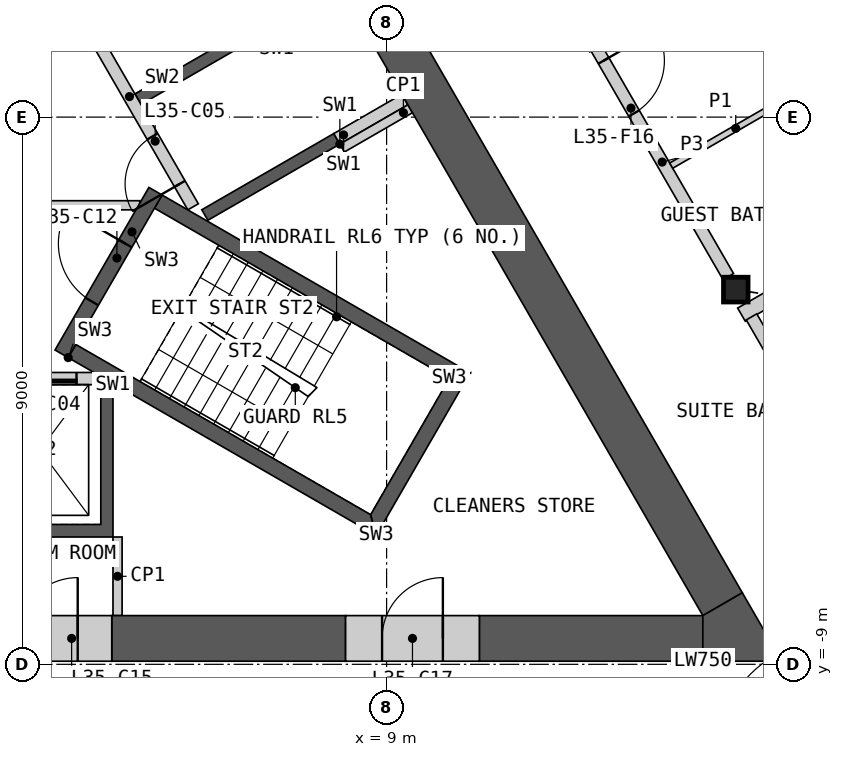
"""IFC4 building model, lengths in metres.
Left out: names, types, materials, properties, quantities, classifications, styles, units other than length and angle.
Written with IfcOpenShell. Run it as: python <this file> out.ifc"""

import sys

from ifc_helpers import new_model, si_unit, direction, frame, frame_2d, origin, origin_2d, place, context, subcontext, project, spatial, polyline, rectangle, i_section, outline, extrude, element, fill, save


model = new_model("IFC4")
c1 = context("Model", 3, precision=1e-05, world=origin(), true_north=direction((0.0, 1.0)))
c2 = subcontext(c1, "Body", "Model", "MODEL_VIEW")
j1 = project(units=[si_unit("LENGTHUNIT", "METRE"), si_unit("PLANEANGLEUNIT", "RADIAN")], contexts=[c1])
p1 = place(None, origin())
s1 = spatial("IfcSite", under=j1, at=p1, CompositionType="ELEMENT")
p2 = place(p1, origin())
s2 = spatial("IfcBuilding", under=s1, at=p2, CompositionType="ELEMENT")
p3 = place(p2, frame((0.0, 0.0, 169.2)))
s3 = spatial("IfcBuildingStorey", under=s2, at=p3, CompositionType="ELEMENT", Elevation=169.2)
p4 = place(p3, frame((14.743, -2.837, 0.0), z_axis=(0.0, 0.0, 1.0), x_axis=(1.0, 0.0, 0.0)))
e1 = element("IfcColumn", 1, at=p4, inside=s3, PredefinedType="COLUMN", context=c2, shape_type="SweptSolid", body=[
    extrude(i_section(OverallWidth=0.404, OverallDepth=0.407, WebThickness=0.027, FlangeThickness=0.044, at=origin_2d()), origin(), (0.0, 0.0, 1.0), 3.6),
])
p5 = place(p3, origin())
e2 = element("IfcWall", 2, at=p5, inside=s3, PredefinedType="SHEAR", context=c2, shape_type="SweptSolid", body=[
    extrude(outline(polyline([(4.5, -4.4), (4.5, -6.906), (2.1, -6.906), (2.1, -4.4), (2.3, -4.4), (2.3, -6.7), (4.3, -6.7), (4.3, -4.4), (4.5, -4.4)])), origin(), (0.0, 0.0, 1.0), 3.25),
])
p6 = place(p3, frame((-4.187, -4.3, 0.0), z_axis=(0.0, 0.0, 1.0), x_axis=(1.0, 0.0, 0.0)))
e3 = element("IfcWall", 3, at=p6, inside=s3, PredefinedType="SOLIDWALL", context=c2, shape_type="SweptSolid", body=[
    extrude(rectangle(XDim=8.373, YDim=0.2, at=frame_2d((4.187, 0.0))), origin(), (0.0, 0.0, 1.0), 3.25),
])
p7 = place(p6, frame((0.287, 0.0, 0.0)))
e4 = element("IfcOpeningElement", 4, at=p7, cuts=e3, PredefinedType="OPENING", context=c2, shape_type="SweptSolid", body=[
    extrude(rectangle(XDim=1.2, YDim=2.1, at=frame_2d((0.6, 1.05))), frame((0.0, 0.11, 0.0), z_axis=(0.0, -1.0, 0.0), x_axis=(1.0, 0.0, 0.0)), (0.0, 0.0, 1.0), 0.22),
])
p8 = place(p6, frame((2.387, 0.0, 0.0)))
e5 = element("IfcOpeningElement", 5, at=p8, cuts=e3, PredefinedType="OPENING", context=c2, shape_type="SweptSolid", body=[
    extrude(rectangle(XDim=1.4, YDim=2.1, at=frame_2d((0.7, 1.05))), frame((0.0, 0.11, 0.0), z_axis=(0.0, -1.0, 0.0), x_axis=(1.0, 0.0, 0.0)), (0.0, 0.0, 1.0), 0.22),
])
p9 = place(p6, frame((4.837, 0.0, 0.0)))
e6 = element("IfcOpeningElement", 6, at=p9, cuts=e3, PredefinedType="OPENING", context=c2, shape_type="SweptSolid", body=[
    extrude(rectangle(XDim=0.9, YDim=2.1, at=frame_2d((0.45, 1.05))), frame((0.0, 0.11, 0.0), z_axis=(0.0, -1.0, 0.0), x_axis=(1.0, 0.0, 0.0)), (0.0, 0.0, 1.0), 0.22),
])
p10 = place(p6, frame((6.887, 0.0, 0.0)))
e7 = element("IfcOpeningElement", 7, at=p10, cuts=e3, PredefinedType="OPENING", context=c2, shape_type="SweptSolid", body=[
    extrude(rectangle(XDim=1.2, YDim=2.1, at=frame_2d((0.6, 1.05))), frame((0.0, 0.11, 0.0), z_axis=(0.0, -1.0, 0.0), x_axis=(1.0, 0.0, 0.0)), (0.0, 0.0, 1.0), 0.22),
])
p11 = place(p3, origin())
e8 = element("IfcWall", 8, at=p11, inside=s3, PredefinedType="SHEAR", context=c2, shape_type="SweptSolid", body=[
    extrude(outline(polyline([(1.561, 6.097), (3.731, 7.35), (7.131, 1.461), (4.96, 0.208), (4.861, 0.381), (6.852, 1.531), (4.752, 5.169), (2.76, 4.019), (2.66, 4.192), (4.652, 5.342), (3.652, 7.074), (1.66, 5.924), (1.561, 6.097)])), origin(), (0.0, 0.0, 1.0), 3.25),
])
p12 = place(p3, origin())
e9 = element("IfcWall", 9, at=p12, inside=s3, PredefinedType="SHEAR", context=c2, shape_type="SweptSolid", body=[
    extrude(outline(polyline([(8.231, -0.444), (6.061, -1.697), (5.96, -1.524), (8.131, -0.271), (8.231, -0.444)])), origin(), (0.0, 0.0, 1.0), 3.25),
])
p13 = place(p3, frame((5.817, -1.476, 0.0), z_axis=(0.0, 0.0, 1.0), x_axis=(-0.500002616675, 0.866023893041, 0.0)))
e10 = element("IfcWall", 10, at=p13, inside=s3, PredefinedType="SOLIDWALL", context=c2, shape_type="SweptSolid", body=[
    extrude(rectangle(XDim=8.373, YDim=0.2, at=frame_2d((4.187, 0.0))), origin(), (0.0, 0.0, 1.0), 3.25),
])
p14 = place(p13, frame((0.437, 0.0, 0.0)))
e11 = element("IfcOpeningElement", 11, at=p14, cuts=e10, PredefinedType="OPENING", context=c2, shape_type="SweptSolid", body=[
    extrude(rectangle(XDim=0.9, YDim=2.1, at=frame_2d((0.45, 1.05))), frame((0.0, 0.11, 0.0), z_axis=(0.0, -1.0, 0.0), x_axis=(1.0, 0.0, 0.0)), (0.0, 0.0, 1.0), 0.22),
])
p15 = place(p13, frame((3.737, 0.0, 0.0)))
e12 = element("IfcOpeningElement", 12, at=p15, cuts=e10, PredefinedType="OPENING", context=c2, shape_type="SweptSolid", body=[
    extrude(rectangle(XDim=0.9, YDim=2.1, at=frame_2d((0.45, 1.05))), frame((0.0, 0.11, 0.0), z_axis=(0.0, -1.0, 0.0), x_axis=(1.0, 0.0, 0.0)), (0.0, 0.0, 1.0), 0.22),
])
p16 = place(p13, frame((6.937, 0.0, 0.0)))
e13 = element("IfcOpeningElement", 13, at=p16, cuts=e10, PredefinedType="OPENING", context=c2, shape_type="SweptSolid", body=[
    extrude(rectangle(XDim=1.1, YDim=2.1, at=frame_2d((0.55, 1.05))), frame((0.0, 0.11, 0.0), z_axis=(0.0, -1.0, 0.0), x_axis=(1.0, 0.0, 0.0)), (0.0, 0.0, 1.0), 0.22),
])
p17 = place(p3, frame((8.181, -0.357, 0.0), z_axis=(0.0, 0.0, 1.0), x_axis=(0.866003189247, 0.500038474733, 0.0)))
e14 = element("IfcWall", 14, at=p17, inside=s3, PredefinedType="SHEAR", context=c2, shape_type="SweptSolid", body=[
    extrude(rectangle(XDim=1.293, YDim=0.2, at=frame_2d((0.646, 0.0))), origin(), (0.0, 0.0, 1.0), 3.25),
])
p18 = place(p3, frame((-4.941, -1.45, 0.0), z_axis=(0.0, 0.0, 1.0), x_axis=(1.0, 0.0, 0.0)))
e15 = element("IfcWall", 15, at=p18, inside=s3, PredefinedType="PARTITIONING", context=c2, shape_type="SweptSolid", body=[
    extrude(rectangle(XDim=9.882, YDim=0.15, at=frame_2d((4.941, 0.0))), origin(), (0.0, 0.0, 1.0), 3.25),
])
p19 = place(p18, frame((4.391, 0.0, 0.0)))
e16 = element("IfcOpeningElement", 16, at=p19, cuts=e15, PredefinedType="OPENING", context=c2, shape_type="SweptSolid", body=[
    extrude(rectangle(XDim=1.1, YDim=2.1, at=frame_2d((0.55, 1.05))), frame((0.0, 0.085, 0.0), z_axis=(0.0, -1.0, 0.0), x_axis=(1.0, 0.0, 0.0)), (0.0, 0.0, 1.0), 0.17),
])
p20 = place(p3, origin())
e17 = element("IfcWall", 17, at=p20, inside=s3, PredefinedType="SHEAR", context=c2, shape_type="SweptSolid", body=[
    extrude(outline(polyline([(3.763, -3.956), (8.83, -6.881), (8.738, -6.539), (3.888, -3.739), (3.763, -3.956)])), origin(), (0.0, 0.0, 1.0), 3.25),
])
p21 = place(p3, origin())
e18 = element("IfcWall", 18, at=p21, inside=s3, PredefinedType="SHEAR", context=c2, shape_type="SweptSolid", body=[
    extrude(outline(polyline([(8.83, -6.881), (10.374, -4.206), (10.032, -4.298), (8.738, -6.539), (8.83, -6.881)])), origin(), (0.0, 0.0, 1.0), 3.25),
])
p22 = place(p3, origin())
e19 = element("IfcWall", 19, at=p22, inside=s3, PredefinedType="SHEAR", context=c2, shape_type="SweptSolid", body=[
    extrude(outline(polyline([(10.032, -4.298), (10.374, -4.206), (5.307, -1.281), (5.182, -1.498), (10.032, -4.298)])), origin(), (0.0, 0.0, 1.0), 3.25),
])
p23 = place(p3, frame((3.655, -3.893, 0.0), z_axis=(0.0, 0.0, 1.0), x_axis=(0.499982516597, 0.866035497597, 0.0)))
e20 = element("IfcWall", 20, at=p23, inside=s3, PredefinedType="SHEAR", context=c2, shape_type="SweptSolid", body=[
    extrude(rectangle(XDim=3.088, YDim=0.25, at=frame_2d((1.544, 0.0))), origin(), (0.0, 0.0, 1.0), 3.25),
])
p24 = place(p23, frame((0.994, 0.0, 0.0)))
e21 = element("IfcOpeningElement", 21, at=p24, cuts=e20, PredefinedType="OPENING", context=c2, shape_type="SweptSolid", body=[
    extrude(rectangle(XDim=1.1, YDim=2.1, at=frame_2d((0.55, 1.05))), frame((0.0, 0.135, 0.0), z_axis=(0.0, -1.0, 0.0), x_axis=(1.0, 0.0, 0.0)), (0.0, 0.0, 1.0), 0.27),
])
for number, where, z_axis, x_axis in (
    (22, (4.575, -6.906, 0.0), (0.0, 0.0, 1.0), (0.0, -1.0, 0.0)),
    (23, (8.268, -0.509, 0.0), (0.0, 0.0, 1.0), (0.866, 0.5, 0.0)),
):
    element("IfcWall", number, at=place(p3, frame(where, z_axis=z_axis, x_axis=x_axis)), inside=s3, PredefinedType="PARTITIONING", context=c2, shape_type="SweptSolid", body=[
        extrude(rectangle(XDim=1.293, YDim=0.15, at=frame_2d((0.646, 0.0))), origin(), (0.0, 0.0, 1.0), 3.25),
    ])
p25 = place(p3, frame((4.48, -8.574, 0.0), z_axis=(0.0, 0.0, 1.0), x_axis=(1.0, 0.0, 0.0)))
e24 = element("IfcWall", 24, at=p25, inside=s3, PredefinedType="SHEAR", context=c2, shape_type="SweptSolid", body=[
    extrude(rectangle(XDim=3.845, YDim=0.75, at=frame_2d((1.923, 0.0))), origin(), (0.0, 0.0, 1.0), 3.25),
])
p26 = place(p3, frame((10.525, -8.574, 0.0), z_axis=(0.0, 0.0, 1.0), x_axis=(1.0, 0.0, 0.0)))
e25 = element("IfcWall", 25, at=p26, inside=s3, PredefinedType="SHEAR", context=c2, shape_type="SweptSolid", body=[
    extrude(rectangle(XDim=3.676, YDim=0.75, at=frame_2d((1.838, 0.0))), origin(), (0.0, 0.0, 1.0), 3.25),
])
p27 = place(p3, frame((14.526, -8.011, 0.0), z_axis=(0.0, 0.0, 1.0), x_axis=(-0.499994855372, 0.866028374016, 0.0)))
e26 = element("IfcWall", 26, at=p27, inside=s3, PredefinedType="SHEAR", context=c2, shape_type="SweptSolid", body=[
    extrude(rectangle(XDim=14.301, YDim=0.75, at=frame_2d((7.15, 0.0))), origin(), (0.0, 0.0, 1.0), 3.25),
])
p28 = place(p3, origin())
e27 = element("IfcWall", 27, at=p28, inside=s3, PredefinedType="SHEAR", context=c2, shape_type="SweptSolid", body=[
    extrude(outline(polyline([(14.201, -8.949), (14.201, -8.199), (14.851, -7.824), (15.5, -8.949), (14.201, -8.949)])), origin(), (0.0, 0.0, 1.0), 3.25),
])
p29 = place(p3, frame((2.32, -8.574, 0.0), z_axis=(0.0, 0.0, 1.0), x_axis=(1.0, 0.0, 0.0)))
e28 = element("IfcWall", 28, at=p29, inside=s3, PredefinedType="SHEAR", context=c2, shape_type="SweptSolid", body=[
    extrude(rectangle(XDim=2.16, YDim=0.75, at=frame_2d((1.08, 0.0))), origin(), (0.0, 0.0, 1.0), 3.25),
])
p30 = place(p29, frame((0.6, 0.0, 0.0)))
e29 = element("IfcOpeningElement", 29, at=p30, cuts=e28, PredefinedType="OPENING", context=c2, shape_type="SweptSolid", body=[
    extrude(rectangle(XDim=1.0, YDim=2.1, at=frame_2d((0.5, 1.05))), frame((0.0, 0.385, 0.0), z_axis=(0.0, -1.0, 0.0), x_axis=(1.0, 0.0, 0.0)), (0.0, 0.0, 1.0), 0.77),
])
p31 = place(p3, frame((8.325, -8.574, 0.0), z_axis=(0.0, 0.0, 1.0), x_axis=(1.0, 0.0, 0.0)))
e30 = element("IfcWall", 30, at=p31, inside=s3, PredefinedType="SHEAR", context=c2, shape_type="SweptSolid", body=[
    extrude(rectangle(XDim=2.2, YDim=0.75, at=frame_2d((1.1, 0.0))), origin(), (0.0, 0.0, 1.0), 3.25),
])
p32 = place(p31, frame((0.6, 0.0, 0.0)))
e31 = element("IfcOpeningElement", 31, at=p32, cuts=e30, PredefinedType="OPENING", context=c2, shape_type="SweptSolid", body=[
    extrude(rectangle(XDim=1.0, YDim=2.1, at=frame_2d((0.5, 1.05))), frame((0.0, 0.385, 0.0), z_axis=(0.0, -1.0, 0.0), x_axis=(1.0, 0.0, 0.0)), (0.0, 0.0, 1.0), 0.77),
])
p33 = place(p3, frame((14.836, -3.249, 0.0), z_axis=(0.0, 0.0, 1.0), x_axis=(0.866022412254, 0.500005181446, 0.0)))
e32 = element("IfcWall", 32, at=p33, inside=s3, PredefinedType="PARTITIONING", context=c2, shape_type="SweptSolid", body=[
    extrude(rectangle(XDim=13.081, YDim=0.25, at=frame_2d((6.541, 0.0))), origin(), (0.0, 0.0, 1.0), 2.404),
])
p34 = place(p3, frame((15.002, -3.286, 0.0), z_axis=(0.0, 0.0, 1.0), x_axis=(0.500007607708, -0.866021011428, 0.0)))
e33 = element("IfcWall", 33, at=p34, inside=s3, PredefinedType="PARTITIONING", context=c2, shape_type="SweptSolid", body=[
    extrude(rectangle(XDim=5.484, YDim=0.2, at=frame_2d((2.742, 0.0))), origin(), (0.0, 0.0, 1.0), 3.25),
])
p35 = place(p34, frame((4.032, 0.0, 0.0)))
e34 = element("IfcOpeningElement", 34, at=p35, cuts=e33, PredefinedType="OPENING", context=c2, shape_type="SweptSolid", body=[
    extrude(rectangle(XDim=1.1, YDim=2.1, at=frame_2d((0.55, 1.05))), frame((0.0, 0.11, 0.0), z_axis=(0.0, -1.0, 0.0), x_axis=(1.0, 0.0, 0.0)), (0.0, 0.0, 1.0), 0.22),
])
p36 = place(p3, frame((12.444, 1.145, 0.0), z_axis=(0.0, 0.0, 1.0), x_axis=(0.500007404367, -0.866021128829, 0.0)))
e35 = element("IfcWall", 35, at=p36, inside=s3, PredefinedType="PARTITIONING", context=c2, shape_type="SweptSolid", body=[
    extrude(rectangle(XDim=4.351, YDim=0.2, at=frame_2d((2.176, 0.0))), origin(), (0.0, 0.0, 1.0), 3.25),
])
p37 = place(p36, frame((0.25, 0.0, 0.0)))
e36 = element("IfcOpeningElement", 36, at=p37, cuts=e35, PredefinedType="OPENING", context=c2, shape_type="SweptSolid", body=[
    extrude(rectangle(XDim=1.0, YDim=2.1, at=frame_2d((0.5, 1.05))), frame((0.0, 0.11, 0.0), z_axis=(0.0, -1.0, 0.0), x_axis=(1.0, 0.0, 0.0)), (0.0, 0.0, 1.0), 0.22),
])
p38 = place(p3, frame((13.681, -0.798, 0.0), z_axis=(0.0, 0.0, 1.0), x_axis=(0.866032905446, 0.499987006516, 0.0)))
e37 = element("IfcWall", 37, at=p38, inside=s3, PredefinedType="PARTITIONING", context=c2, shape_type="SweptSolid", body=[
    extrude(rectangle(XDim=2.45, YDim=0.1, at=frame_2d((1.225, 0.0))), origin(), (0.0, 0.0, 1.0), 2.404),
])
p39 = place(p10, origin())
e38 = element("IfcDoor", 38, at=p39, inside=s3, OperationType="SLIDING_TO_LEFT", PredefinedType="DOOR", context=c2, shape_type="SweptSolid", body=[
    extrude(rectangle(XDim=1.2, YDim=2.1, at=frame_2d((0.6, 1.05))), frame((0.0, 0.025, 0.0), z_axis=(0.0, -1.0, 0.0), x_axis=(1.0, 0.0, 0.0)), (0.0, 0.0, 1.0), 0.05),
])
fill(e7, e38)
p40 = place(p14, origin())
e39 = element("IfcDoor", 39, at=p40, inside=s3, OperationType="SINGLE_SWING_LEFT", PredefinedType="DOOR", context=c2, shape_type="SweptSolid", body=[
    extrude(rectangle(XDim=0.9, YDim=2.1, at=frame_2d((0.45, 1.05))), frame((0.0, 0.025, 0.0), z_axis=(0.0, -1.0, 0.0), x_axis=(1.0, 0.0, 0.0)), (0.0, 0.0, 1.0), 0.05),
])
fill(e11, e39)
p41 = place(p24, origin())
e40 = element("IfcDoor", 40, at=p41, inside=s3, OperationType="SINGLE_SWING_RIGHT", PredefinedType="DOOR", context=c2, shape_type="SweptSolid", body=[
    extrude(rectangle(XDim=1.1, YDim=2.1, at=frame_2d((0.55, 1.05))), frame((0.0, 0.025, 0.0), z_axis=(0.0, -1.0, 0.0), x_axis=(1.0, 0.0, 0.0)), (0.0, 0.0, 1.0), 0.05),
])
fill(e21, e40)
p42 = place(p30, origin())
e41 = element("IfcDoor", 41, at=p42, inside=s3, OperationType="SINGLE_SWING_RIGHT", PredefinedType="DOOR", context=c2, shape_type="SweptSolid", body=[
    extrude(rectangle(XDim=1.0, YDim=2.1, at=frame_2d((0.5, 1.05))), frame((0.0, 0.13, 0.0), z_axis=(0.0, -1.0, 0.0), x_axis=(1.0, 0.0, 0.0)), (0.0, 0.0, 1.0), 0.05),
])
fill(e29, e41)
p43 = place(p32, origin())
e42 = element("IfcDoor", 42, at=p43, inside=s3, OperationType="SINGLE_SWING_RIGHT", PredefinedType="DOOR", context=c2, shape_type="SweptSolid", body=[
    extrude(rectangle(XDim=1.0, YDim=2.1, at=frame_2d((0.5, 1.05))), frame((0.0, 0.13, 0.0), z_axis=(0.0, -1.0, 0.0), x_axis=(1.0, 0.0, 0.0)), (0.0, 0.0, 1.0), 0.05),
])
fill(e31, e42)
p44 = place(p37, origin())
e43 = element("IfcDoor", 43, at=p44, inside=s3, OperationType="SINGLE_SWING_LEFT", PredefinedType="DOOR", context=c2, shape_type="SweptSolid", body=[
    extrude(rectangle(XDim=1.0, YDim=2.1, at=frame_2d((0.5, 1.05))), frame((0.0, 0.025, 0.0), z_axis=(0.0, -1.0, 0.0), x_axis=(1.0, 0.0, 0.0)), (0.0, 0.0, 1.0), 0.05),
])
fill(e36, e43)
save(model, sys.argv[1])
